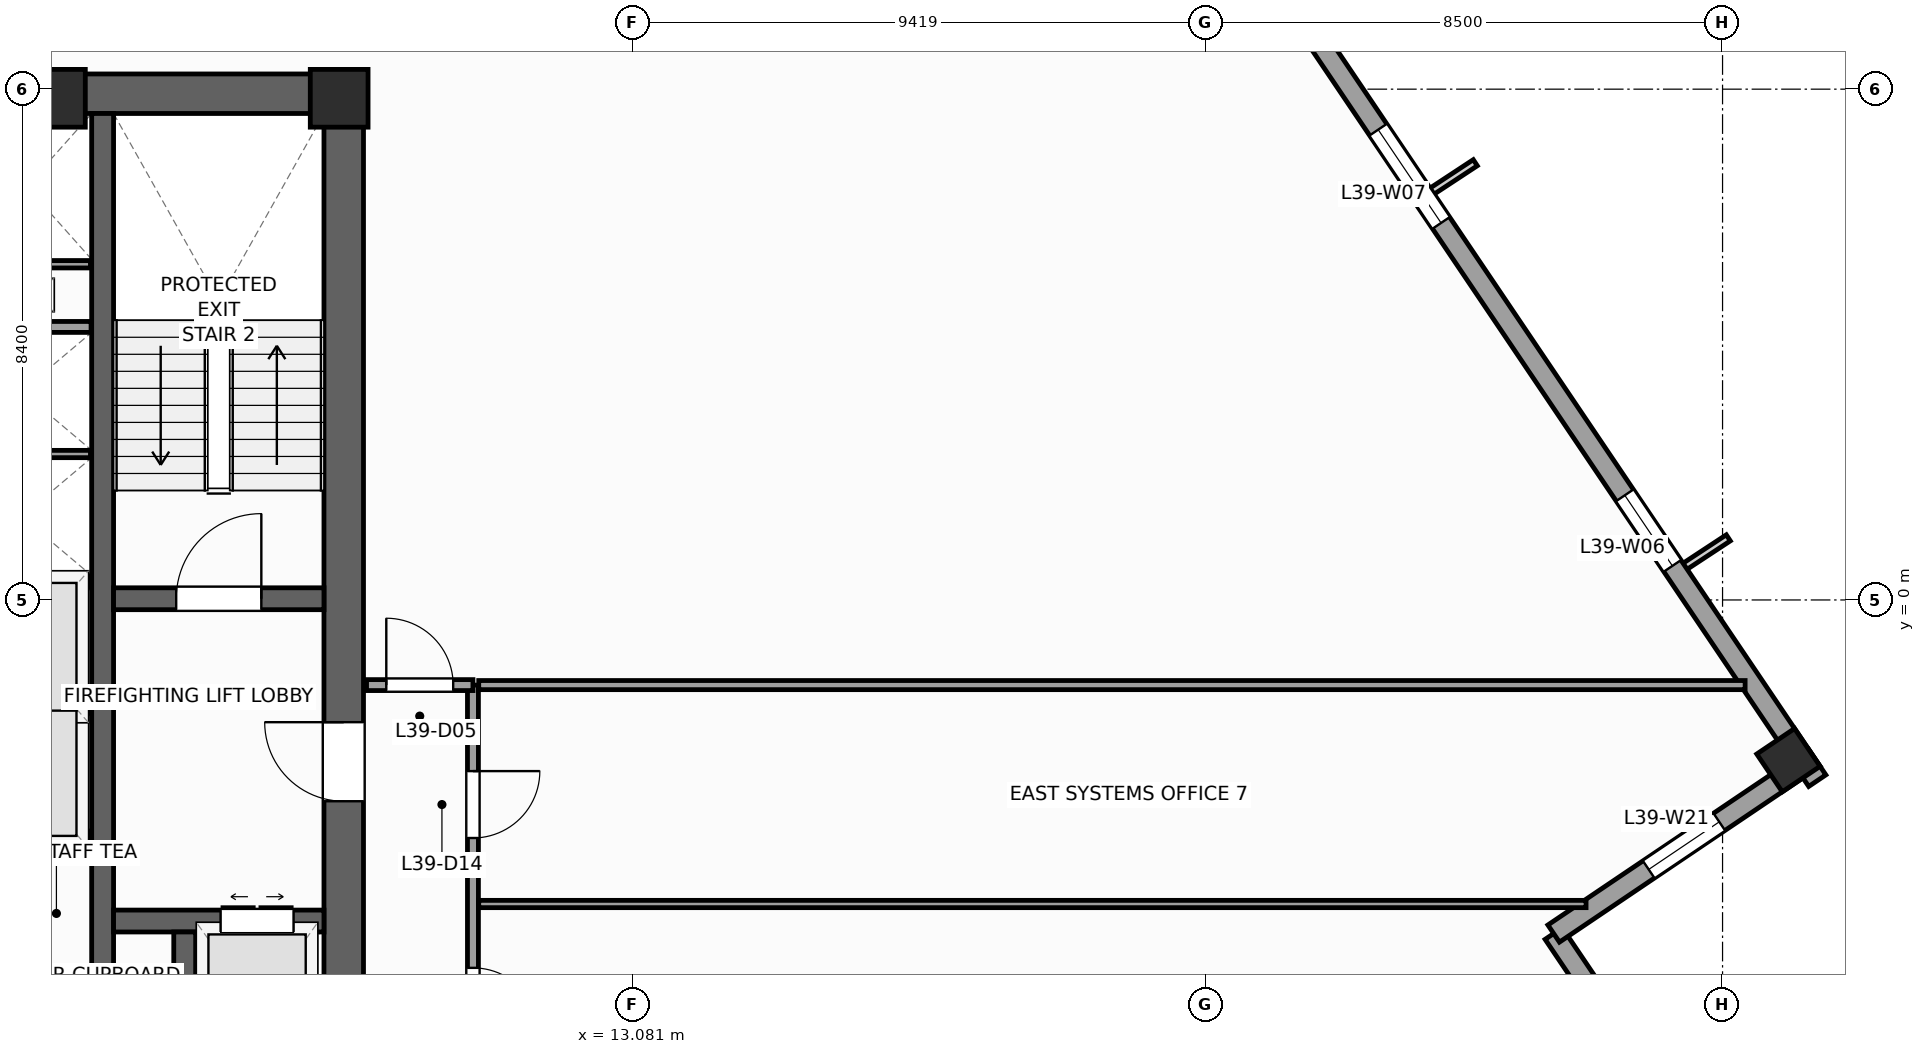
"""IFC4 building model, lengths in metres.
Left out: names, types, materials, properties, quantities, classifications, styles, units other than length and angle.
Written with IfcOpenShell. Run it as: python <this file> out.ifc"""

import sys

from ifc_helpers import new_model, si_unit, direction, frame, frame_2d, origin, origin_2d, place, context, subcontext, project, spatial, rectangle, extrude, source, transform, mapped, element, fill, save


model = new_model("IFC4")
c1 = context("Model", 3, precision=1e-05, world=origin(), true_north=direction((0.0, 1.0)))
c2 = subcontext(c1, "Body", "Model", "MODEL_VIEW")
j1 = project(units=[si_unit("LENGTHUNIT", "METRE"), si_unit("PLANEANGLEUNIT", "RADIAN")], contexts=[c1])
p1 = place(None, origin())
s1 = spatial("IfcSite", under=j1, at=p1, CompositionType="ELEMENT")
p2 = place(p1, origin())
s2 = spatial("IfcBuilding", under=s1, at=p2, CompositionType="ELEMENT")
p3 = place(p2, frame((0.0, 0.0, 164.4)))
s3 = spatial("IfcBuildingStorey", under=s2, at=p3, CompositionType="ELEMENT", Elevation=164.4)
p4 = place(p3, frame((-8.65, 8.325, 0.0), z_axis=(0.0, 0.0, 1.0), x_axis=(1.0, 0.0, 0.0)))
e1 = element("IfcWall", 1, at=p4, inside=s3, PredefinedType="SHEAR", context=c2, shape_type="SweptSolid", body=[
    extrude(rectangle(XDim=17.3, YDim=0.65, at=frame_2d((8.65, 0.0))), origin(), (0.0, 0.0, 1.0), 4.0),
])
p5 = place(p3, frame((8.325, -8.0, 0.0), z_axis=(0.0, 0.0, 1.0), x_axis=(0.0, 1.0, 0.0)))
e2 = element("IfcWall", 2, at=p5, inside=s3, PredefinedType="SHEAR", context=c2, shape_type="SweptSolid", body=[
    extrude(rectangle(XDim=16.0, YDim=0.65, at=frame_2d((8.0, 0.0))), origin(), (0.0, 0.0, 1.0), 4.0),
])
p6 = place(p5, frame((4.69, 0.0, 0.0)))
e3 = element("IfcOpeningElement", 3, at=p6, cuts=e2, PredefinedType="OPENING", context=c2, shape_type="SweptSolid", body=[
    extrude(rectangle(XDim=1.3, YDim=2.2, at=frame_2d((0.65, 1.1))), frame((0.0, 0.335, 0.0), z_axis=(0.0, -1.0, 0.0), x_axis=(1.0, 0.0, 0.0)), (0.0, 0.0, 1.0), 0.67),
])
p7 = place(p3, frame((4.36, -8.0, 0.0), z_axis=(0.0, 0.0, 1.0), x_axis=(0.0, 1.0, 0.0)))
e4 = element("IfcWall", 4, at=p7, inside=s3, PredefinedType="SHEAR", context=c2, shape_type="SweptSolid", body=[
    extrude(rectangle(XDim=16.0, YDim=0.36, at=frame_2d((8.0, 0.0))), origin(), (0.0, 0.0, 1.0), 4.0),
])
p8 = place(p3, frame((4.54, 0.02, 0.0), z_axis=(0.0, 0.0, 1.0), x_axis=(1.0, 0.0, 0.0)))
e5 = element("IfcWall", 5, at=p8, inside=s3, PredefinedType="SHEAR", context=c2, shape_type="SweptSolid", body=[
    extrude(rectangle(XDim=3.46, YDim=0.36, at=frame_2d((1.73, 0.0))), origin(), (0.0, 0.0, 1.0), 4.0),
])
p9 = place(p8, frame((1.03, 0.0, 0.0)))
e6 = element("IfcOpeningElement", 6, at=p9, cuts=e5, PredefinedType="OPENING", context=c2, shape_type="SweptSolid", body=[
    extrude(rectangle(XDim=1.4, YDim=2.2, at=frame_2d((0.7, 1.1))), frame((0.0, 0.19, 0.0), z_axis=(0.0, -1.0, 0.0), x_axis=(1.0, 0.0, 0.0)), (0.0, 0.0, 1.0), 0.38),
])
p10 = place(p3, frame((4.54, -5.28, 0.0), z_axis=(0.0, 0.0, 1.0), x_axis=(1.0, 0.0, 0.0)))
e7 = element("IfcWall", 7, at=p10, inside=s3, PredefinedType="SHEAR", context=c2, shape_type="SweptSolid", body=[
    extrude(rectangle(XDim=3.46, YDim=0.36, at=frame_2d((1.73, 0.0))), origin(), (0.0, 0.0, 1.0), 4.0),
])
p11 = place(p10, frame((1.76, 0.0, 0.0)))
e8 = element("IfcOpeningElement", 8, at=p11, cuts=e7, PredefinedType="OPENING", context=c2, shape_type="SweptSolid", body=[
    extrude(rectangle(XDim=1.2, YDim=2.25, at=frame_2d((0.6, 1.125))), frame((0.0, 0.19, 0.0), z_axis=(0.0, -1.0, 0.0), x_axis=(1.0, 0.0, 0.0)), (0.0, 0.0, 1.0), 0.38),
])
p12 = place(p3, frame((5.71, -8.0, 0.0), z_axis=(0.0, 0.0, 1.0), x_axis=(0.0, 1.0, 0.0)))
e9 = element("IfcWall", 9, at=p12, inside=s3, PredefinedType="SHEAR", context=c2, shape_type="SweptSolid", body=[
    extrude(rectangle(XDim=2.54, YDim=0.36, at=frame_2d((1.27, 0.0))), origin(), (0.0, 0.0, 1.0), 4.0),
])
m1 = source(origin(), c2, "Body", "SweptSolid", [
    extrude(rectangle(XDim=0.95, YDim=0.95, at=origin_2d()), origin(), (0.0, 0.0, 1.0), 4.0),
])
for number, where, z_axis, x_axis in (
    (10, (8.25, 8.25, 0.0), (0.0, 0.0, 1.0), (1.0, 0.0, 0.0)),
    (11, (3.6, 8.25, 0.0), (0.0, 0.0, 1.0), (1.0, 0.0, 0.0)),
):
    element("IfcColumn", number, at=place(p3, frame(where, z_axis=z_axis, x_axis=x_axis)), inside=s3, PredefinedType="PILASTER", context=c2, shape_type="MappedRepresentation", body=[
        mapped(m1, transform((0.0, 0.0, 0.0), scale=1.0)),
    ])
m2 = source(origin(), c2, "Body", "SweptSolid", [
    extrude(rectangle(XDim=0.75, YDim=0.75, at=origin_2d()), origin(), (0.0, 0.0, 1.0), 4.0),
])
p13 = place(p3, frame((32.083, -2.635, 0.0), z_axis=(0.0, 0.0, 1.0), x_axis=(0.829037572555, 0.559192903471, 0.0)))
e12 = element("IfcColumn", 12, at=p13, inside=s3, PredefinedType="COLUMN", context=c2, shape_type="MappedRepresentation", body=[
    mapped(m2, transform((0.0, 0.0, 0.0), scale=1.0)),
])
p14 = place(p3, frame((31.019, -9.631, 0.0), z_axis=(0.0, 0.0, 1.0), x_axis=(-0.559210350234, 0.829025804298, 0.0)))
e13 = element("IfcWall", 13, at=p14, inside=s3, PredefinedType="STANDARD", context=c2, shape_type="SweptSolid", body=[
    extrude(rectangle(XDim=5.0, YDim=0.34, at=frame_2d((2.5, 0.0))), origin(), (0.0, 0.0, 1.0), 3.74),
])
p15 = place(p3, frame((28.223, -5.486, 0.0), z_axis=(0.0, 0.0, 1.0), x_axis=(0.82905227345, 0.559171107879, 0.0)))
e14 = element("IfcWall", 14, at=p15, inside=s3, PredefinedType="STANDARD", context=c2, shape_type="SweptSolid", body=[
    extrude(rectangle(XDim=5.17, YDim=0.34, at=frame_2d((2.585, 0.0))), origin(), (0.0, 0.0, 1.0), 3.04),
])
p16 = place(p15, frame((1.885, 0.0, 0.56)))
e15 = element("IfcOpeningElement", 15, at=p16, cuts=e14, PredefinedType="OPENING", context=c2, shape_type="SweptSolid", body=[
    extrude(rectangle(XDim=1.4, YDim=2.4, at=frame_2d((0.7, 1.2))), frame((0.0, 0.18, 0.0), z_axis=(0.0, -1.0, 0.0), x_axis=(1.0, 0.0, 0.0)), (0.0, 0.0, 1.0), 0.36),
])
p17 = place(p3, frame((32.558, -2.972, 0.0), z_axis=(0.0, 0.0, 1.0), x_axis=(-0.559194910251, 0.829036218961, 0.0)))
e16 = element("IfcWall", 16, at=p17, inside=s3, PredefinedType="STANDARD", context=c2, shape_type="SweptSolid", body=[
    extrude(rectangle(XDim=41.34, YDim=0.34, at=frame_2d((20.67, 0.0))), origin(), (0.0, 0.0, 1.0), 3.04),
])
p18 = place(p17, frame((4.261, 0.0, 0.56)))
e17 = element("IfcOpeningElement", 17, at=p18, cuts=e16, PredefinedType="OPENING", context=c2, shape_type="SweptSolid", body=[
    extrude(rectangle(XDim=1.4, YDim=2.4, at=frame_2d((0.7, 1.2))), frame((0.0, 0.18, 0.0), z_axis=(0.0, -1.0, 0.0), x_axis=(1.0, 0.0, 0.0)), (0.0, 0.0, 1.0), 0.36),
])
p19 = place(p17, frame((11.064, 0.0, 0.61)))
e18 = element("IfcOpeningElement", 18, at=p19, cuts=e16, PredefinedType="OPENING", context=c2, shape_type="SweptSolid", body=[
    extrude(rectangle(XDim=1.85, YDim=2.35, at=frame_2d((0.925, 1.175))), frame((0.0, 0.18, 0.0), z_axis=(0.0, -1.0, 0.0), x_axis=(1.0, 0.0, 0.0)), (0.0, 0.0, 1.0), 0.36),
])
p20 = place(p17, frame((18.168, 0.0, 0.61)))
e19 = element("IfcOpeningElement", 19, at=p20, cuts=e16, PredefinedType="OPENING", context=c2, shape_type="SweptSolid", body=[
    extrude(rectangle(XDim=1.85, YDim=2.35, at=frame_2d((0.925, 1.175))), frame((0.0, 0.18, 0.0), z_axis=(0.0, -1.0, 0.0), x_axis=(1.0, 0.0, 0.0)), (0.0, 0.0, 1.0), 0.36),
])
p21 = place(p17, frame((27.186, 0.0, 0.61)))
e20 = element("IfcOpeningElement", 20, at=p21, cuts=e16, PredefinedType="OPENING", context=c2, shape_type="SweptSolid", body=[
    extrude(rectangle(XDim=1.85, YDim=2.35, at=frame_2d((0.925, 1.175))), frame((0.0, 0.18, 0.0), z_axis=(0.0, -1.0, 0.0), x_axis=(1.0, 0.0, 0.0)), (0.0, 0.0, 1.0), 0.36),
])
p22 = place(p17, frame((34.852, 0.0, 0.56)))
e21 = element("IfcOpeningElement", 21, at=p22, cuts=e16, PredefinedType="OPENING", context=c2, shape_type="SweptSolid", body=[
    extrude(rectangle(XDim=1.4, YDim=2.4, at=frame_2d((0.7, 1.2))), frame((0.0, 0.18, 0.0), z_axis=(0.0, -1.0, 0.0), x_axis=(1.0, 0.0, 0.0)), (0.0, 0.0, 1.0), 0.36),
])
for number, where, z_axis, x_axis in (
    (22, (1.89, -3.9, 0.0), (0.0, 0.0, 1.0), (1.0, 0.0, 0.0)),
    (23, (1.89, 0.3, 0.0), (0.0, 0.0, 1.0), (1.0, 0.0, 0.0)),
    (24, (1.89, 4.49, 0.0), (0.0, 0.0, 1.0), (1.0, 0.0, 0.0)),
):
    element("IfcWall", number, at=place(p3, frame(where, z_axis=z_axis, x_axis=x_axis)), inside=s3, PredefinedType="PARTITIONING", context=c2, shape_type="SweptSolid", body=[
        extrude(rectangle(XDim=2.28, YDim=0.18, at=frame_2d((1.14, 0.0))), origin(), (0.0, 0.0, 1.0), 3.74),
    ])
for number, where, z_axis, x_axis in (
    (25, (1.9, -1.8, 0.0), (0.0, 0.0, 1.0), (1.0, 0.0, 0.0)),
    (26, (1.9, 2.4, 0.0), (0.0, 0.0, 1.0), (1.0, 0.0, 0.0)),
):
    element("IfcWall", number, at=place(p3, frame(where, z_axis=z_axis, x_axis=x_axis)), inside=s3, PredefinedType="PARTITIONING", context=c2, shape_type="SweptSolid", body=[
        extrude(rectangle(XDim=2.26, YDim=0.12, at=frame_2d((1.13, 0.0))), origin(), (0.0, 0.0, 1.0), 3.74),
    ])
p23 = place(p3, frame((2.06, 5.52, 0.0), z_axis=(0.0, 0.0, 1.0), x_axis=(1.0, 0.0, 0.0)))
e27 = element("IfcWall", 27, at=p23, inside=s3, PredefinedType="PARTITIONING", context=c2, shape_type="SweptSolid", body=[
    extrude(rectangle(XDim=2.1, YDim=0.12, at=frame_2d((1.05, 0.0))), origin(), (0.0, 0.0, 1.0), 3.74),
])
p24 = place(p3, frame((10.45, -11.45, 0.0), z_axis=(0.0, 0.0, 1.0), x_axis=(0.0, 1.0, 0.0)))
e28 = element("IfcWall", 28, at=p24, inside=s3, PredefinedType="PARTITIONING", context=c2, shape_type="SweptSolid", body=[
    extrude(rectangle(XDim=10.05, YDim=0.18, at=frame_2d((5.025, 0.0))), origin(), (0.0, 0.0, 1.0), 3.74),
])
p25 = place(p24, frame((4.3, 0.0, 0.0)))
e29 = element("IfcOpeningElement", 29, at=p25, cuts=e28, PredefinedType="OPENING", context=c2, shape_type="SweptSolid", body=[
    extrude(rectangle(XDim=1.1, YDim=2.2, at=frame_2d((0.55, 1.1))), frame((0.0, 0.1, 0.0), z_axis=(0.0, -1.0, 0.0), x_axis=(1.0, 0.0, 0.0)), (0.0, 0.0, 1.0), 0.2),
])
p26 = place(p24, frame((7.536, 0.0, 0.0)))
e30 = element("IfcOpeningElement", 30, at=p26, cuts=e28, PredefinedType="OPENING", context=c2, shape_type="SweptSolid", body=[
    extrude(rectangle(XDim=1.1, YDim=2.2, at=frame_2d((0.55, 1.1))), frame((0.0, 0.1, 0.0), z_axis=(0.0, -1.0, 0.0), x_axis=(1.0, 0.0, 0.0)), (0.0, 0.0, 1.0), 0.2),
])
p27 = place(p3, frame((8.7, -1.4, 0.0), z_axis=(0.0, 0.0, 1.0), x_axis=(1.0, 0.0, 0.0)))
e31 = element("IfcWall", 31, at=p27, inside=s3, PredefinedType="PARTITIONING", context=c2, shape_type="SweptSolid", body=[
    extrude(rectangle(XDim=1.75, YDim=0.18, at=frame_2d((0.875, 0.0))), origin(), (0.0, 0.0, 1.0), 3.74),
])
p28 = place(p27, frame((0.325, 0.0, 0.0)))
e32 = element("IfcOpeningElement", 32, at=p28, cuts=e31, PredefinedType="OPENING", context=c2, shape_type="SweptSolid", body=[
    extrude(rectangle(XDim=1.1, YDim=2.2, at=frame_2d((0.55, 1.1))), frame((0.0, 0.1, 0.0), z_axis=(0.0, -1.0, 0.0), x_axis=(1.0, 0.0, 0.0)), (0.0, 0.0, 1.0), 0.2),
])
p29 = place(p3, frame((10.545, -1.4, 0.0), z_axis=(0.0, 0.0, 1.0), x_axis=(1.0, 0.0, 0.0)))
e33 = element("IfcWall", 33, at=p29, inside=s3, PredefinedType="PARTITIONING", context=c2, shape_type="SweptSolid", body=[
    extrude(rectangle(XDim=20.826, YDim=0.15, at=frame_2d((10.413, 0.0))), origin(), (0.0, 0.0, 1.0), 3.74),
])
p30 = place(p3, frame((10.545, -5.0, 0.0), z_axis=(0.0, 0.0, 1.0), x_axis=(1.0, 0.0, 0.0)))
e34 = element("IfcWall", 34, at=p30, inside=s3, PredefinedType="PARTITIONING", context=c2, shape_type="SweptSolid", body=[
    extrude(rectangle(XDim=18.21, YDim=0.12, at=frame_2d((9.105, 0.0))), origin(), (0.0, 0.0, 1.0), 3.74),
])
m3 = source(origin(), c2, "Body", "SweptSolid", [
    extrude(rectangle(XDim=1.4, YDim=2.4, at=frame_2d((0.7, 1.2))), frame((0.0, 0.03, 0.0), z_axis=(0.0, -1.0, 0.0), x_axis=(1.0, 0.0, 0.0)), (0.0, 0.0, 1.0), 0.06),
])
p31 = place(p18, origin())
e35 = element("IfcWindow", 35, at=p31, inside=s3, PartitioningType="SINGLE_PANEL", PredefinedType="WINDOW", context=c2, shape_type="MappedRepresentation", body=[
    mapped(m3, transform((0.0, 0.0, 0.0), scale=1.0)),
])
fill(e17, e35)
m4 = source(origin(), c2, "Body", "SweptSolid", [
    extrude(rectangle(XDim=1.85, YDim=2.35, at=frame_2d((0.925, 1.175))), frame((0.0, 0.03, 0.0), z_axis=(0.0, -1.0, 0.0), x_axis=(1.0, 0.0, 0.0)), (0.0, 0.0, 1.0), 0.06),
])
p32 = place(p19, origin())
e36 = element("IfcWindow", 36, at=p32, inside=s3, PartitioningType="SINGLE_PANEL", PredefinedType="WINDOW", context=c2, shape_type="MappedRepresentation", body=[
    mapped(m4, transform((0.0, 0.0, 0.0), scale=1.0)),
])
fill(e18, e36)
p33 = place(p16, origin())
e37 = element("IfcWindow", 37, at=p33, inside=s3, PartitioningType="SINGLE_PANEL", PredefinedType="WINDOW", context=c2, shape_type="MappedRepresentation", body=[
    mapped(m3, transform((0.0, 0.0, 0.0), scale=1.0)),
])
fill(e15, e37)
m5 = source(origin(), c2, "Body", "SweptSolid", [
    extrude(rectangle(XDim=1.4, YDim=2.2, at=frame_2d((0.7, 1.1))), frame((0.0, 0.025, 0.0), z_axis=(0.0, -1.0, 0.0), x_axis=(1.0, 0.0, 0.0)), (0.0, 0.0, 1.0), 0.05),
])
p34 = place(p9, origin())
e38 = element("IfcDoor", 38, at=p34, inside=s3, OperationType="SINGLE_SWING_RIGHT", PredefinedType="DOOR", context=c2, shape_type="MappedRepresentation", body=[
    mapped(m5, transform((0.0, 0.0, 0.0), scale=1.0)),
])
fill(e6, e38)
m6 = source(origin(), c2, "Body", "SweptSolid", [
    extrude(rectangle(XDim=1.3, YDim=2.2, at=frame_2d((0.65, 1.1))), frame((0.0, 0.025, 0.0), z_axis=(0.0, -1.0, 0.0), x_axis=(1.0, 0.0, 0.0)), (0.0, 0.0, 1.0), 0.05),
])
p35 = place(p6, origin())
e39 = element("IfcDoor", 39, at=p35, inside=s3, OperationType="SINGLE_SWING_RIGHT", PredefinedType="DOOR", context=c2, shape_type="MappedRepresentation", body=[
    mapped(m6, transform((0.0, 0.0, 0.0), scale=1.0)),
])
fill(e3, e39)
m7 = source(origin(), c2, "Body", "SweptSolid", [
    extrude(rectangle(XDim=1.2, YDim=2.25, at=frame_2d((0.6, 1.125))), frame((0.0, 0.025, 0.0), z_axis=(0.0, -1.0, 0.0), x_axis=(1.0, 0.0, 0.0)), (0.0, 0.0, 1.0), 0.05),
])
p36 = place(p11, origin())
e40 = element("IfcDoor", 40, at=p36, inside=s3, OperationType="DOUBLE_DOOR_SLIDING", PredefinedType="DOOR", context=c2, shape_type="MappedRepresentation", body=[
    mapped(m7, transform((0.0, 0.0, 0.0), scale=1.0)),
])
fill(e8, e40)
m8 = source(origin(), c2, "Body", "SweptSolid", [
    extrude(rectangle(XDim=1.1, YDim=2.2, at=frame_2d((0.55, 1.1))), frame((0.0, 0.025, 0.0), z_axis=(0.0, -1.0, 0.0), x_axis=(1.0, 0.0, 0.0)), (0.0, 0.0, 1.0), 0.05),
])
p37 = place(p28, origin())
e41 = element("IfcDoor", 41, at=p37, inside=s3, OperationType="SINGLE_SWING_LEFT", PredefinedType="DOOR", context=c2, shape_type="MappedRepresentation", body=[
    mapped(m8, transform((0.0, 0.0, 0.0), scale=1.0)),
])
fill(e32, e41)
p38 = place(p25, frame((1.1, 0.0, 0.0), z_axis=(0.0, 0.0, 1.0), x_axis=(-1.0, 0.0, 0.0)))
e42 = element("IfcDoor", 42, at=p38, inside=s3, OperationType="SINGLE_SWING_LEFT", PredefinedType="DOOR", context=c2, shape_type="MappedRepresentation", body=[
    mapped(m8, transform((0.0, 0.0, 0.0), scale=1.0)),
])
fill(e29, e42)
p39 = place(p26, frame((1.1, 0.0, 0.0), z_axis=(0.0, 0.0, 1.0), x_axis=(-1.0, 0.0, 0.0)))
e43 = element("IfcDoor", 43, at=p39, inside=s3, OperationType="SINGLE_SWING_RIGHT", PredefinedType="DOOR", context=c2, shape_type="MappedRepresentation", body=[
    mapped(m8, transform((0.0, 0.0, 0.0), scale=1.0)),
])
fill(e30, e43)
save(model, sys.argv[1])
